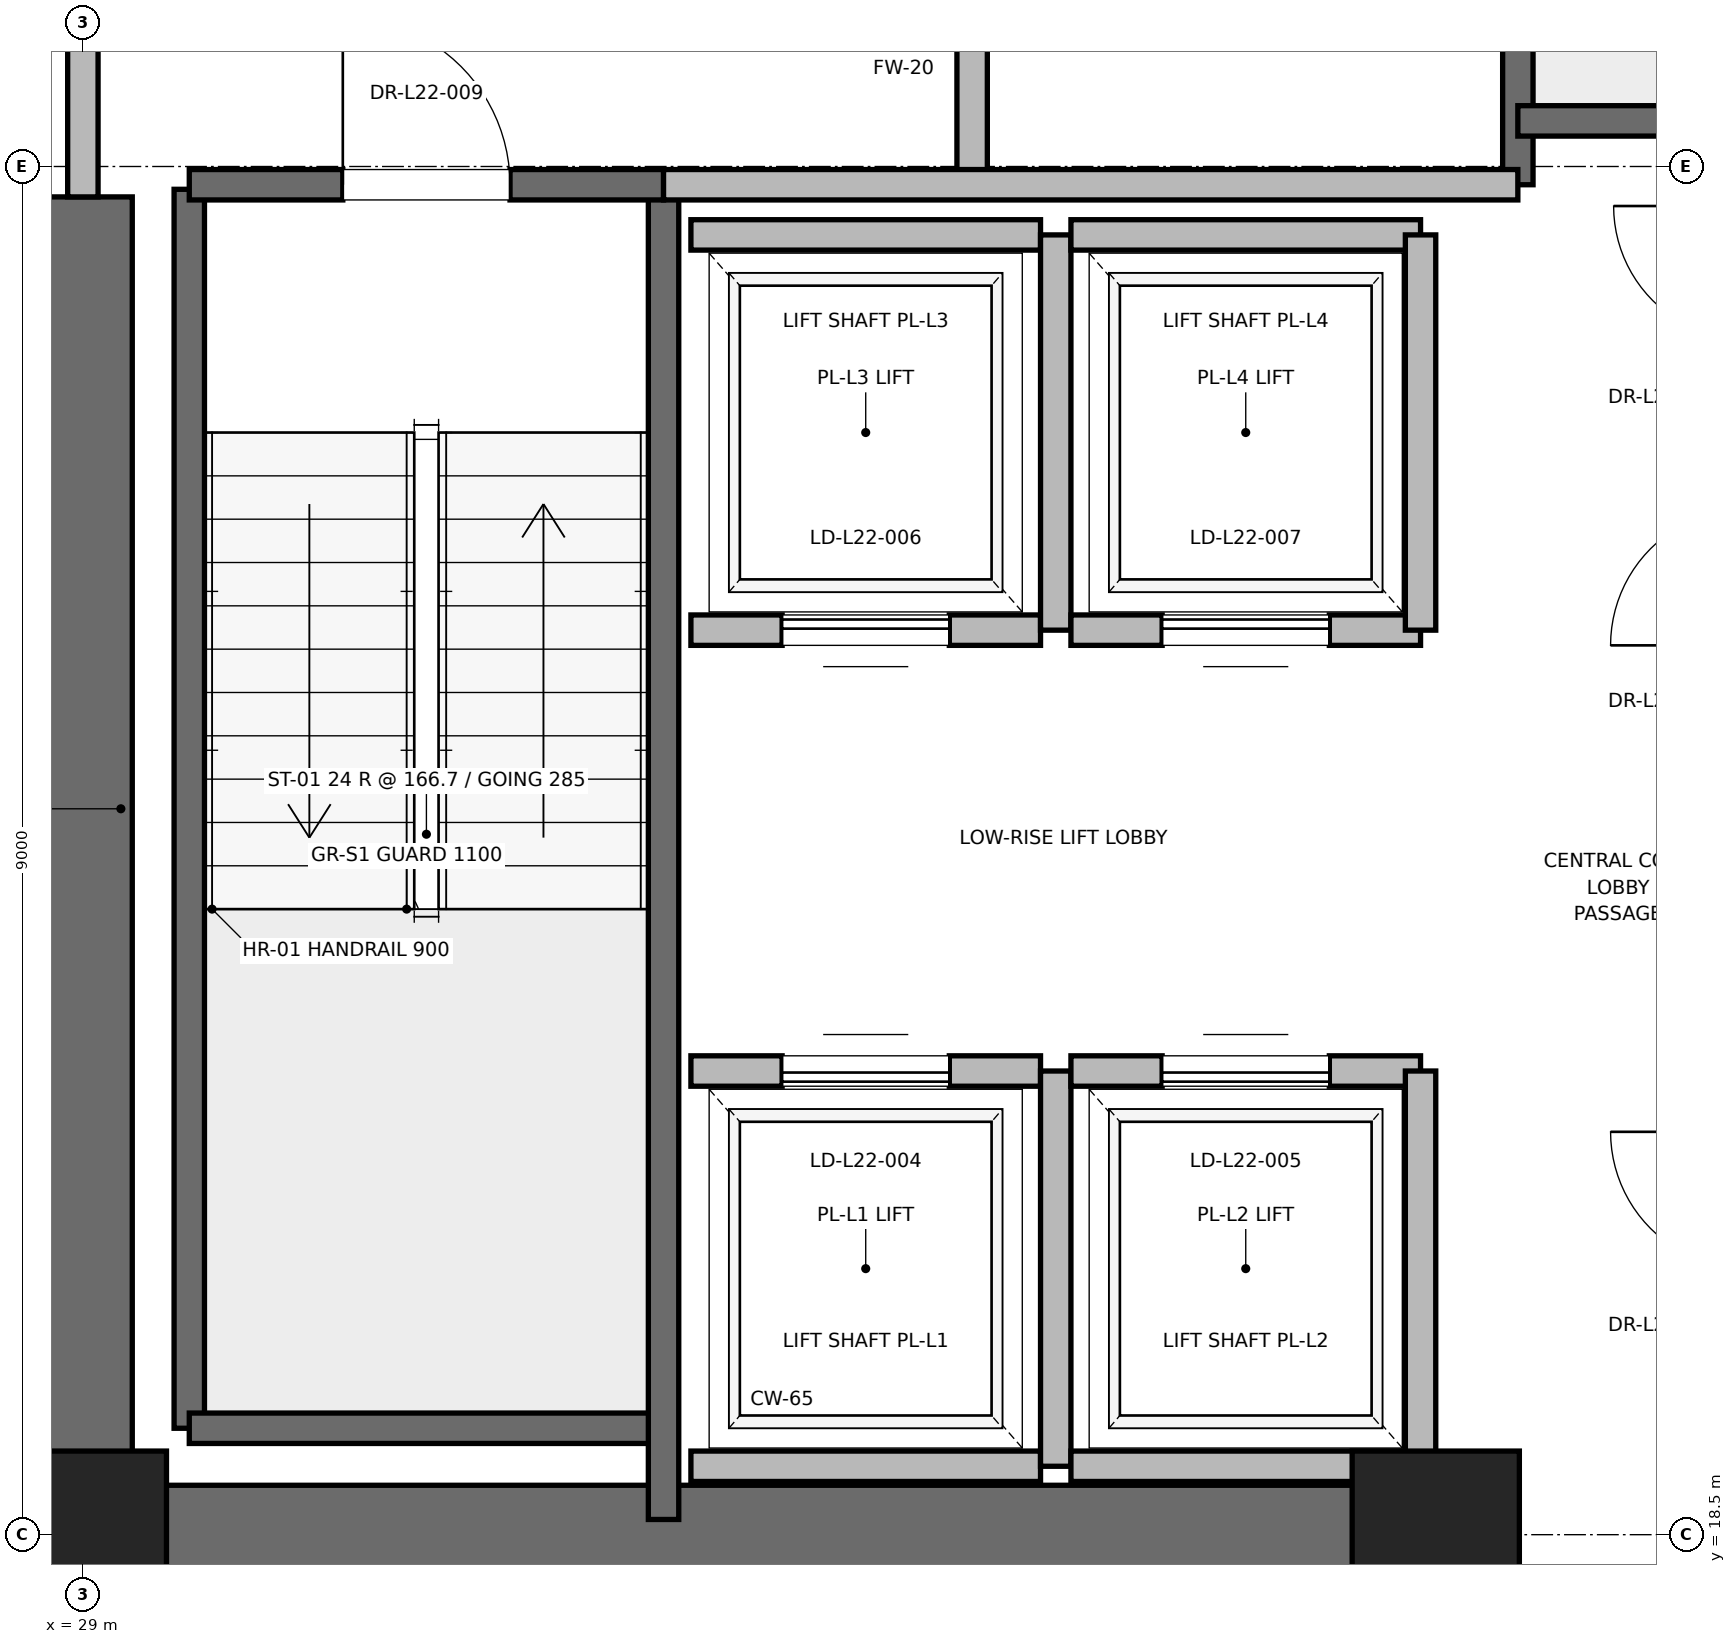
"""IFC4 building model, lengths in metres.
Left out: names, types, materials, properties, quantities, classifications, styles, units other than length and angle.
Written with IfcOpenShell. Run it as: python <this file> out.ifc"""

import sys

from ifc_helpers import new_model, si_unit, direction, frame, frame_2d, origin, origin_2d, place, context, subcontext, project, spatial, rectangle, extrude, element, fill, save


model = new_model("IFC4")
c1 = context("Model", 3, precision=1e-05, world=origin(), true_north=direction((0.0, 1.0)))
c2 = subcontext(c1, "Body", "Model", "MODEL_VIEW")
j1 = project(units=[si_unit("LENGTHUNIT", "METRE"), si_unit("PLANEANGLEUNIT", "RADIAN")], contexts=[c1])
p1 = place(None, origin())
s1 = spatial("IfcSite", under=j1, at=p1, CompositionType="ELEMENT")
p2 = place(p1, origin())
s2 = spatial("IfcBuilding", under=s1, at=p2, CompositionType="ELEMENT")
p3 = place(p2, frame((0.0, 0.0, 95.6)))
s3 = spatial("IfcBuildingStorey", under=s2, at=p3, CompositionType="ELEMENT", Elevation=95.6)
for number, where, z_axis, x_axis in (
    (1, (29.0, 18.5, 0.0), (0.0, 0.0, 1.0), (1.0, 0.0, 0.0)),
    (2, (37.9, 18.5, 0.0), (0.0, 0.0, 1.0), (1.0, 0.0, 0.0)),
):
    element("IfcColumn", number, at=place(p3, frame(where, z_axis=z_axis, x_axis=x_axis)), inside=s3, PredefinedType="PILASTER", context=c2, shape_type="SweptSolid", body=[
        extrude(rectangle(XDim=1.1, YDim=1.1, at=origin_2d()), origin(), (0.0, 0.0, 1.0), 4.0),
    ])
p4 = place(p3, frame((29.0, 18.5, 0.0), z_axis=(0.0, 0.0, 1.0), x_axis=(1.0, 0.0, 0.0)))
e3 = element("IfcWall", 3, at=p4, inside=s3, PredefinedType="SHEAR", context=c2, shape_type="SweptSolid", body=[
    extrude(rectangle(XDim=9.2, YDim=0.65, at=frame_2d((4.6, 0.0))), origin(), (0.0, 0.0, 1.0), 3.76),
])
p5 = place(p3, frame((29.0, 18.5, 0.0), z_axis=(0.0, 0.0, 1.0), x_axis=(0.0, 1.0, 0.0)))
e4 = element("IfcWall", 4, at=p5, inside=s3, PredefinedType="SHEAR", context=c2, shape_type="SweptSolid", body=[
    extrude(rectangle(XDim=8.8, YDim=0.65, at=frame_2d((4.4, 0.0))), origin(), (0.0, 0.0, 1.0), 3.76),
])
p6 = place(p3, frame((29.7, 19.2, 0.0), z_axis=(0.0, 0.0, 1.0), x_axis=(0.0, 1.0, 0.0)))
e5 = element("IfcWall", 5, at=p6, inside=s3, PredefinedType="SOLIDWALL", context=c2, shape_type="SweptSolid", body=[
    extrude(rectangle(XDim=8.15, YDim=0.2, at=frame_2d((4.075, 0.0))), origin(), (0.0, 0.0, 1.0), 3.76),
])
p7 = place(p3, frame((29.7, 19.2, 0.0), z_axis=(0.0, 0.0, 1.0), x_axis=(1.0, 0.0, 0.0)))
e6 = element("IfcWall", 6, at=p7, inside=s3, PredefinedType="SOLIDWALL", context=c2, shape_type="SweptSolid", body=[
    extrude(rectangle(XDim=3.12, YDim=0.2, at=frame_2d((1.56, 0.0))), origin(), (0.0, 0.0, 1.0), 3.76),
])
p8 = place(p3, frame((32.82, 18.6, 0.0), z_axis=(0.0, 0.0, 1.0), x_axis=(0.0, 1.0, 0.0)))
e7 = element("IfcWall", 7, at=p8, inside=s3, PredefinedType="SOLIDWALL", context=c2, shape_type="SweptSolid", body=[
    extrude(rectangle(XDim=8.78, YDim=0.2, at=frame_2d((4.39, 0.0))), origin(), (0.0, 0.0, 1.0), 3.76),
])
p9 = place(p3, frame((29.7, 27.38, 0.0), z_axis=(0.0, 0.0, 1.0), x_axis=(1.0, 0.0, 0.0)))
e8 = element("IfcWall", 8, at=p9, inside=s3, PredefinedType="SOLIDWALL", context=c2, shape_type="SweptSolid", body=[
    extrude(rectangle(XDim=3.12, YDim=0.2, at=frame_2d((1.56, 0.0))), origin(), (0.0, 0.0, 1.0), 3.76),
])
p10 = place(p9, frame((1.01, 0.0, 0.0)))
e9 = element("IfcOpeningElement", 9, at=p10, cuts=e8, PredefinedType="OPENING", context=c2, shape_type="SweptSolid", body=[
    extrude(rectangle(XDim=1.1, YDim=2.15, at=frame_2d((0.55, 1.075))), frame((0.0, 0.1, 0.0), z_axis=(0.0, -1.0, 0.0), x_axis=(1.0, 0.0, 0.0)), (0.0, 0.0, 1.0), 0.2),
])
p11 = place(p3, frame((38.44, 27.38, 0.0), z_axis=(0.0, 0.0, 1.0), x_axis=(0.0, 1.0, 0.0)))
e10 = element("IfcWall", 10, at=p11, inside=s3, PredefinedType="SOLIDWALL", context=c2, shape_type="SweptSolid", body=[
    extrude(rectangle(XDim=8.87, YDim=0.2, at=frame_2d((4.435, 0.0))), origin(), (0.0, 0.0, 1.0), 3.76),
])
p12 = place(p3, frame((38.44, 27.8, 0.0), z_axis=(0.0, 0.0, 1.0), x_axis=(1.0, 0.0, 0.0)))
e11 = element("IfcWall", 11, at=p12, inside=s3, PredefinedType="SOLIDWALL", context=c2, shape_type="SweptSolid", body=[
    extrude(rectangle(XDim=3.32, YDim=0.2, at=frame_2d((1.66, 0.0))), origin(), (0.0, 0.0, 1.0), 3.76),
])
p13 = place(p3, frame((34.85, 27.38, 0.0), z_axis=(0.0, 0.0, 1.0), x_axis=(0.0, 1.0, 0.0)))
e12 = element("IfcWall", 12, at=p13, inside=s3, PredefinedType="PARTITIONING", context=c2, shape_type="SweptSolid", body=[
    extrude(rectangle(XDim=3.37, YDim=0.2, at=frame_2d((1.685, 0.0))), origin(), (0.0, 0.0, 1.0), 3.76),
])
p14 = place(p13, frame((1.11, 0.0, 0.0)))
e13 = element("IfcOpeningElement", 13, at=p14, cuts=e12, PredefinedType="OPENING", context=c2, shape_type="SweptSolid", body=[
    extrude(rectangle(XDim=1.15, YDim=2.2, at=frame_2d((0.575, 1.1))), frame((0.0, 0.1, 0.0), z_axis=(0.0, -1.0, 0.0), x_axis=(1.0, 0.0, 0.0)), (0.0, 0.0, 1.0), 0.2),
])
p15 = place(p3, frame((29.0, 27.3, 0.0), z_axis=(0.0, 0.0, 1.0), x_axis=(0.0, 1.0, 0.0)))
e14 = element("IfcWall", 14, at=p15, inside=s3, PredefinedType="PARTITIONING", context=c2, shape_type="SweptSolid", body=[
    extrude(rectangle(XDim=3.4, YDim=0.2, at=frame_2d((1.7, 0.0))), origin(), (0.0, 0.0, 1.0), 2.54),
])
p16 = place(p15, frame((1.125, 0.0, 0.0)))
e15 = element("IfcOpeningElement", 15, at=p16, cuts=e14, PredefinedType="OPENING", context=c2, shape_type="SweptSolid", body=[
    extrude(rectangle(XDim=1.15, YDim=2.2, at=frame_2d((0.575, 1.1))), frame((0.0, 0.1, 0.0), z_axis=(0.0, -1.0, 0.0), x_axis=(1.0, 0.0, 0.0)), (0.0, 0.0, 1.0), 0.2),
])
p17 = place(p3, frame((32.82, 27.38, 0.0), z_axis=(0.0, 0.0, 1.0), x_axis=(1.0, 0.0, 0.0)))
e16 = element("IfcWall", 16, at=p17, inside=s3, PredefinedType="PARTITIONING", context=c2, shape_type="SweptSolid", body=[
    extrude(rectangle(XDim=5.62, YDim=0.2, at=frame_2d((2.81, 0.0))), origin(), (0.0, 0.0, 1.0), 3.76),
])
p18 = place(p3, frame((33.0, 18.95, 0.0), z_axis=(0.0, 0.0, 1.0), x_axis=(1.0, 0.0, 0.0)))
e17 = element("IfcWall", 17, at=p18, inside=s3, PredefinedType="SOLIDWALL", context=c2, shape_type="SweptSolid", body=[
    extrude(rectangle(XDim=2.3, YDim=0.2, at=frame_2d((1.15, 0.0))), origin(), (0.0, 0.0, 1.0), 3.76),
])
p19 = place(p3, frame((35.3, 21.55, 0.0), z_axis=(0.0, 0.0, 1.0), x_axis=(-1.0, 0.0, 0.0)))
e18 = element("IfcWall", 18, at=p19, inside=s3, PredefinedType="SOLIDWALL", context=c2, shape_type="SweptSolid", body=[
    extrude(rectangle(XDim=2.3, YDim=0.2, at=frame_2d((1.15, 0.0))), origin(), (0.0, 0.0, 1.0), 3.76),
])
p20 = place(p19, frame((0.6, 0.0, 0.0)))
e19 = element("IfcOpeningElement", 19, at=p20, cuts=e18, PredefinedType="OPENING", context=c2, shape_type="SweptSolid", body=[
    extrude(rectangle(XDim=1.1, YDim=2.2, at=frame_2d((0.55, 1.1))), frame((0.0, 0.1, 0.0), z_axis=(0.0, -1.0, 0.0), x_axis=(1.0, 0.0, 0.0)), (0.0, 0.0, 1.0), 0.2),
])
p21 = place(p3, frame((35.4, 18.95, 0.0), z_axis=(0.0, 0.0, 1.0), x_axis=(0.0, 1.0, 0.0)))
e20 = element("IfcWall", 20, at=p21, inside=s3, PredefinedType="SOLIDWALL", context=c2, shape_type="SweptSolid", body=[
    extrude(rectangle(XDim=2.6, YDim=0.2, at=frame_2d((1.3, 0.0))), origin(), (0.0, 0.0, 1.0), 3.76),
])
p22 = place(p3, frame((35.5, 18.95, 0.0), z_axis=(0.0, 0.0, 1.0), x_axis=(1.0, 0.0, 0.0)))
e21 = element("IfcWall", 21, at=p22, inside=s3, PredefinedType="SOLIDWALL", context=c2, shape_type="SweptSolid", body=[
    extrude(rectangle(XDim=2.3, YDim=0.2, at=frame_2d((1.15, 0.0))), origin(), (0.0, 0.0, 1.0), 2.54),
])
p23 = place(p3, frame((37.8, 21.55, 0.0), z_axis=(0.0, 0.0, 1.0), x_axis=(-1.0, 0.0, 0.0)))
e22 = element("IfcWall", 22, at=p23, inside=s3, PredefinedType="SOLIDWALL", context=c2, shape_type="SweptSolid", body=[
    extrude(rectangle(XDim=2.3, YDim=0.2, at=frame_2d((1.15, 0.0))), origin(), (0.0, 0.0, 1.0), 3.76),
])
p24 = place(p23, frame((0.6, 0.0, 0.0)))
e23 = element("IfcOpeningElement", 23, at=p24, cuts=e22, PredefinedType="OPENING", context=c2, shape_type="SweptSolid", body=[
    extrude(rectangle(XDim=1.1, YDim=2.2, at=frame_2d((0.55, 1.1))), frame((0.0, 0.1, 0.0), z_axis=(0.0, -1.0, 0.0), x_axis=(1.0, 0.0, 0.0)), (0.0, 0.0, 1.0), 0.2),
])
p25 = place(p3, frame((37.8, 18.95, 0.0), z_axis=(0.0, 0.0, 1.0), x_axis=(0.0, 1.0, 0.0)))
e24 = element("IfcWall", 24, at=p25, inside=s3, PredefinedType="SOLIDWALL", context=c2, shape_type="SweptSolid", body=[
    extrude(rectangle(XDim=2.6, YDim=0.2, at=frame_2d((1.3, 0.0))), origin(), (0.0, 0.0, 1.0), 2.54),
])
p26 = place(p3, frame((33.0, 24.45, 0.0), z_axis=(0.0, 0.0, 1.0), x_axis=(1.0, 0.0, 0.0)))
e25 = element("IfcWall", 25, at=p26, inside=s3, PredefinedType="SOLIDWALL", context=c2, shape_type="SweptSolid", body=[
    extrude(rectangle(XDim=2.3, YDim=0.2, at=frame_2d((1.15, 0.0))), origin(), (0.0, 0.0, 1.0), 3.76),
])
p27 = place(p26, frame((0.6, 0.0, 0.0)))
e26 = element("IfcOpeningElement", 26, at=p27, cuts=e25, PredefinedType="OPENING", context=c2, shape_type="SweptSolid", body=[
    extrude(rectangle(XDim=1.1, YDim=2.2, at=frame_2d((0.55, 1.1))), frame((0.0, 0.1, 0.0), z_axis=(0.0, -1.0, 0.0), x_axis=(1.0, 0.0, 0.0)), (0.0, 0.0, 1.0), 0.2),
])
p28 = place(p3, frame((35.3, 27.05, 0.0), z_axis=(0.0, 0.0, 1.0), x_axis=(-1.0, 0.0, 0.0)))
e27 = element("IfcWall", 27, at=p28, inside=s3, PredefinedType="SOLIDWALL", context=c2, shape_type="SweptSolid", body=[
    extrude(rectangle(XDim=2.3, YDim=0.2, at=frame_2d((1.15, 0.0))), origin(), (0.0, 0.0, 1.0), 3.76),
])
p29 = place(p3, frame((35.4, 24.45, 0.0), z_axis=(0.0, 0.0, 1.0), x_axis=(0.0, 1.0, 0.0)))
e28 = element("IfcWall", 28, at=p29, inside=s3, PredefinedType="SOLIDWALL", context=c2, shape_type="SweptSolid", body=[
    extrude(rectangle(XDim=2.6, YDim=0.2, at=frame_2d((1.3, 0.0))), origin(), (0.0, 0.0, 1.0), 3.76),
])
p30 = place(p3, frame((35.5, 24.45, 0.0), z_axis=(0.0, 0.0, 1.0), x_axis=(1.0, 0.0, 0.0)))
e29 = element("IfcWall", 29, at=p30, inside=s3, PredefinedType="SOLIDWALL", context=c2, shape_type="SweptSolid", body=[
    extrude(rectangle(XDim=2.3, YDim=0.2, at=frame_2d((1.15, 0.0))), origin(), (0.0, 0.0, 1.0), 3.76),
])
p31 = place(p30, frame((0.6, 0.0, 0.0)))
e30 = element("IfcOpeningElement", 30, at=p31, cuts=e29, PredefinedType="OPENING", context=c2, shape_type="SweptSolid", body=[
    extrude(rectangle(XDim=1.1, YDim=2.2, at=frame_2d((0.55, 1.1))), frame((0.0, 0.1, 0.0), z_axis=(0.0, -1.0, 0.0), x_axis=(1.0, 0.0, 0.0)), (0.0, 0.0, 1.0), 0.2),
])
p32 = place(p3, frame((37.8, 27.05, 0.0), z_axis=(0.0, 0.0, 1.0), x_axis=(-1.0, 0.0, 0.0)))
e31 = element("IfcWall", 31, at=p32, inside=s3, PredefinedType="SOLIDWALL", context=c2, shape_type="SweptSolid", body=[
    extrude(rectangle(XDim=2.3, YDim=0.2, at=frame_2d((1.15, 0.0))), origin(), (0.0, 0.0, 1.0), 3.76),
])
p33 = place(p3, frame((37.8, 24.45, 0.0), z_axis=(0.0, 0.0, 1.0), x_axis=(0.0, 1.0, 0.0)))
e32 = element("IfcWall", 32, at=p33, inside=s3, PredefinedType="SOLIDWALL", context=c2, shape_type="SweptSolid", body=[
    extrude(rectangle(XDim=2.6, YDim=0.2, at=frame_2d((1.3, 0.0))), origin(), (0.0, 0.0, 1.0), 3.76),
])
p34 = place(p10, origin())
e33 = element("IfcDoor", 33, at=p34, inside=s3, OperationType="SINGLE_SWING_LEFT", PredefinedType="DOOR", context=c2, shape_type="SweptSolid", body=[
    extrude(rectangle(XDim=1.1, YDim=2.15, at=frame_2d((0.55, 1.075))), frame((0.0, 0.025, 0.0), z_axis=(0.0, -1.0, 0.0), x_axis=(1.0, 0.0, 0.0)), (0.0, 0.0, 1.0), 0.05),
])
fill(e9, e33)
p35 = place(p20, origin())
e34 = element("IfcDoor", 34, at=p35, inside=s3, OperationType="SLIDING_TO_RIGHT", PredefinedType="DOOR", context=c2, shape_type="SweptSolid", body=[
    extrude(rectangle(XDim=1.1, YDim=2.2, at=frame_2d((0.55, 1.1))), frame((0.0, 0.025, 0.0), z_axis=(0.0, -1.0, 0.0), x_axis=(1.0, 0.0, 0.0)), (0.0, 0.0, 1.0), 0.05),
])
fill(e19, e34)
p36 = place(p24, origin())
e35 = element("IfcDoor", 35, at=p36, inside=s3, OperationType="SLIDING_TO_RIGHT", PredefinedType="DOOR", context=c2, shape_type="SweptSolid", body=[
    extrude(rectangle(XDim=1.1, YDim=2.2, at=frame_2d((0.55, 1.1))), frame((0.0, 0.025, 0.0), z_axis=(0.0, -1.0, 0.0), x_axis=(1.0, 0.0, 0.0)), (0.0, 0.0, 1.0), 0.05),
])
fill(e23, e35)
p37 = place(p27, origin())
e36 = element("IfcDoor", 36, at=p37, inside=s3, OperationType="SLIDING_TO_RIGHT", PredefinedType="DOOR", context=c2, shape_type="SweptSolid", body=[
    extrude(rectangle(XDim=1.1, YDim=2.2, at=frame_2d((0.55, 1.1))), frame((0.0, 0.025, 0.0), z_axis=(0.0, -1.0, 0.0), x_axis=(1.0, 0.0, 0.0)), (0.0, 0.0, 1.0), 0.05),
])
fill(e26, e36)
p38 = place(p31, origin())
e37 = element("IfcDoor", 37, at=p38, inside=s3, OperationType="SLIDING_TO_RIGHT", PredefinedType="DOOR", context=c2, shape_type="SweptSolid", body=[
    extrude(rectangle(XDim=1.1, YDim=2.2, at=frame_2d((0.55, 1.1))), frame((0.0, 0.025, 0.0), z_axis=(0.0, -1.0, 0.0), x_axis=(1.0, 0.0, 0.0)), (0.0, 0.0, 1.0), 0.05),
])
fill(e30, e37)
save(model, sys.argv[1])
